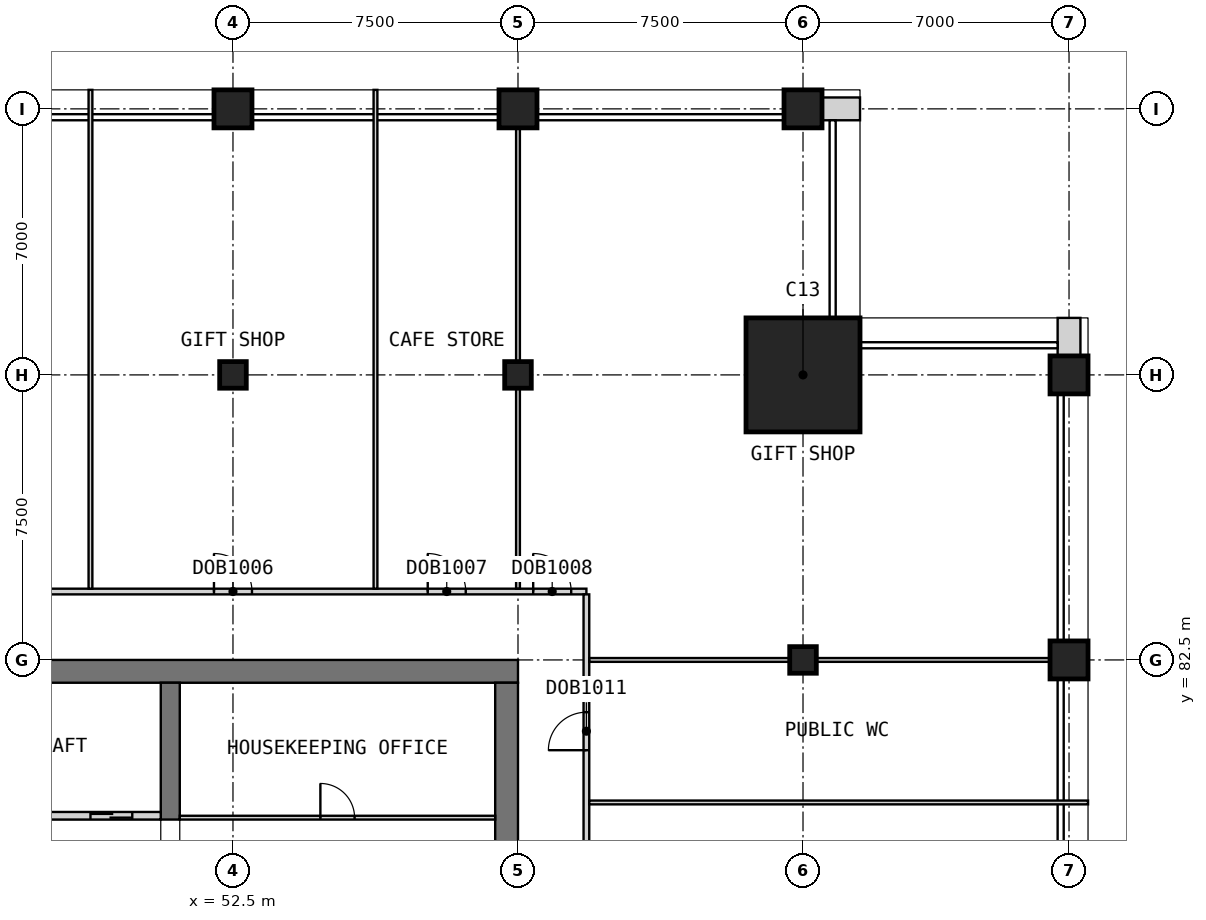
"""IFC4 building model, lengths in metres.
Left out: names, types, materials, properties, quantities, classifications, styles, units other than length and angle.
Written with IfcOpenShell. Run it as: python <this file> out.ifc"""

import sys

from ifc_helpers import new_model, si_unit, direction, frame, frame_2d, origin, origin_2d, place, context, subcontext, project, spatial, rectangle, extrude, element, fill, save


model = new_model("IFC4")
c1 = context("Model", 3, precision=1e-05, world=origin(), true_north=direction((0.0, 1.0)))
c2 = subcontext(c1, "Body", "Model", "MODEL_VIEW")
j1 = project(units=[si_unit("LENGTHUNIT", "METRE"), si_unit("PLANEANGLEUNIT", "RADIAN")], contexts=[c1])
p1 = place(None, origin())
s1 = spatial("IfcSite", under=j1, at=p1, CompositionType="ELEMENT")
p2 = place(p1, origin())
s2 = spatial("IfcBuilding", under=s1, at=p2, CompositionType="ELEMENT")
p3 = place(p2, frame((0.0, 0.0, 302.7)))
s3 = spatial("IfcBuildingStorey", under=s2, at=p3, CompositionType="ELEMENT", Elevation=302.7)
p4 = place(p3, frame((52.5, 90.0, 0.0), z_axis=(0.0, 0.0, 1.0), x_axis=(1.0, 0.0, 0.0)))
e1 = element("IfcColumn", 1, at=p4, inside=s3, PredefinedType="COLUMN", context=c2, shape_type="SweptSolid", body=[
    extrude(rectangle(XDim=0.7, YDim=0.7, at=origin_2d()), origin(), (0.0, 0.0, 1.0), 6.0),
])
p5 = place(p3, frame((52.5, 97.0, 0.0), z_axis=(0.0, 0.0, 1.0), x_axis=(1.0, 0.0, 0.0)))
e2 = element("IfcColumn", 2, at=p5, inside=s3, PredefinedType="COLUMN", context=c2, shape_type="SweptSolid", body=[
    extrude(rectangle(XDim=1.0, YDim=1.0, at=origin_2d()), origin(), (0.0, 0.0, 1.0), 6.0),
])
p6 = place(p3, frame((60.0, 90.0, 0.0), z_axis=(0.0, 0.0, 1.0), x_axis=(1.0, 0.0, 0.0)))
e3 = element("IfcColumn", 3, at=p6, inside=s3, PredefinedType="COLUMN", context=c2, shape_type="SweptSolid", body=[
    extrude(rectangle(XDim=0.7, YDim=0.7, at=origin_2d()), origin(), (0.0, 0.0, 1.0), 6.0),
])
p7 = place(p3, frame((60.0, 97.0, 0.0), z_axis=(0.0, 0.0, 1.0), x_axis=(1.0, 0.0, 0.0)))
e4 = element("IfcColumn", 4, at=p7, inside=s3, PredefinedType="COLUMN", context=c2, shape_type="SweptSolid", body=[
    extrude(rectangle(XDim=1.0, YDim=1.0, at=origin_2d()), origin(), (0.0, 0.0, 1.0), 6.0),
])
p8 = place(p3, frame((67.5, 82.5, 0.0), z_axis=(0.0, 0.0, 1.0), x_axis=(1.0, 0.0, 0.0)))
e5 = element("IfcColumn", 5, at=p8, inside=s3, PredefinedType="COLUMN", context=c2, shape_type="SweptSolid", body=[
    extrude(rectangle(XDim=0.7, YDim=0.7, at=origin_2d()), origin(), (0.0, 0.0, 1.0), 6.0),
])
for number, where, z_axis, x_axis in (
    (6, (67.5, 97.0, 0.0), (0.0, 0.0, 1.0), (1.0, 0.0, 0.0)),
    (7, (74.5, 82.5, 0.0), (0.0, 0.0, 1.0), (1.0, 0.0, 0.0)),
    (8, (74.5, 90.0, 0.0), (0.0, 0.0, 1.0), (1.0, 0.0, 0.0)),
):
    element("IfcColumn", number, at=place(p3, frame(where, z_axis=z_axis, x_axis=x_axis)), inside=s3, PredefinedType="COLUMN", context=c2, shape_type="SweptSolid", body=[
        extrude(rectangle(XDim=1.0, YDim=1.0, at=origin_2d()), origin(), (0.0, 0.0, 1.0), 6.0),
    ])
p9 = place(p3, frame((67.5, 90.0, 0.0), z_axis=(0.0, 0.0, 1.0), x_axis=(1.0, 0.0, 0.0)))
e9 = element("IfcColumn", 9, at=p9, inside=s3, PredefinedType="COLUMN", context=c2, shape_type="SweptSolid", body=[
    extrude(rectangle(XDim=3.0, YDim=3.0, at=origin_2d()), origin(), (0.0, 0.0, 1.0), 6.0),
])
p10 = place(p3, frame((30.0, 82.2, 0.0), z_axis=(0.0, 0.0, 1.0), x_axis=(1.0, 0.0, 0.0)))
e10 = element("IfcWall", 10, at=p10, inside=s3, PredefinedType="SHEAR", context=c2, shape_type="SweptSolid", body=[
    extrude(rectangle(XDim=30.0, YDim=0.6, at=frame_2d((15.0, 0.0))), origin(), (0.0, 0.0, 1.0), 6.0),
])
p11 = place(p3, frame((59.7, 60.6, 0.0), z_axis=(0.0, 0.0, 1.0), x_axis=(0.0, 1.0, 0.0)))
e11 = element("IfcWall", 11, at=p11, inside=s3, PredefinedType="SHEAR", context=c2, shape_type="SweptSolid", body=[
    extrude(rectangle(XDim=21.3, YDim=0.6, at=frame_2d((10.65, 0.0))), origin(), (0.0, 0.0, 1.0), 6.0),
])
p12 = place(p11, frame((14.9, 0.0, 0.0)))
e12 = element("IfcOpeningElement", 12, at=p12, cuts=e11, PredefinedType="OPENING", context=c2, shape_type="SweptSolid", body=[
    extrude(rectangle(XDim=1.8, YDim=2.1, at=frame_2d((0.9, 1.05))), frame((0.0, 0.31, 0.0), z_axis=(0.0, -1.0, 0.0), x_axis=(1.0, 0.0, 0.0)), (0.0, 0.0, 1.0), 0.62),
])
p13 = place(p3, frame((50.85, 78.3, 0.0), z_axis=(0.0, 0.0, 1.0), x_axis=(0.0, 1.0, 0.0)))
e13 = element("IfcWall", 13, at=p13, inside=s3, PredefinedType="SHEAR", context=c2, shape_type="SweptSolid", body=[
    extrude(rectangle(XDim=3.6, YDim=0.5, at=frame_2d((1.8, 0.0))), origin(), (0.0, 0.0, 1.0), 6.0),
])
for number, where, z_axis, x_axis in (
    (14, (74.5, 90.5, 0.0), (0.0, 0.0, 1.0), (0.0, 1.0, 0.0)),
    (15, (69.0, 97.0, 0.0), (0.0, 0.0, 1.0), (-1.0, 0.0, 0.0)),
):
    element("IfcWall", number, at=place(p3, frame(where, z_axis=z_axis, x_axis=x_axis)), inside=s3, PredefinedType="SOLIDWALL", context=c2, shape_type="SweptSolid", body=[
        extrude(rectangle(XDim=1.0, YDim=0.6, at=frame_2d((0.5, 0.0))), origin(), (0.0, 0.0, 1.0), 5.7),
    ])
p14 = place(p3, frame((35.0, 78.4, 0.0), z_axis=(0.0, 0.0, 1.0), x_axis=(1.0, 0.0, 0.0)))
e16 = element("IfcWall", 16, at=p14, inside=s3, PredefinedType="SOLIDWALL", context=c2, shape_type="SweptSolid", body=[
    extrude(rectangle(XDim=15.6, YDim=0.2, at=frame_2d((7.8, 0.0))), origin(), (0.0, 0.0, 1.0), 6.0),
])
p15 = place(p14, frame((0.75, 0.0, 0.0)))
e17 = element("IfcOpeningElement", 17, at=p15, cuts=e16, PredefinedType="OPENING", context=c2, shape_type="SweptSolid", body=[
    extrude(rectangle(XDim=1.1, YDim=2.1, at=frame_2d((0.55, 1.05))), frame((0.0, 0.11, 0.0), z_axis=(0.0, -1.0, 0.0), x_axis=(1.0, 0.0, 0.0)), (0.0, 0.0, 1.0), 0.22),
])
p16 = place(p14, frame((3.35, 0.0, 0.0)))
e18 = element("IfcOpeningElement", 18, at=p16, cuts=e16, PredefinedType="OPENING", context=c2, shape_type="SweptSolid", body=[
    extrude(rectangle(XDim=1.1, YDim=2.1, at=frame_2d((0.55, 1.05))), frame((0.0, 0.11, 0.0), z_axis=(0.0, -1.0, 0.0), x_axis=(1.0, 0.0, 0.0)), (0.0, 0.0, 1.0), 0.22),
])
p17 = place(p14, frame((5.95, 0.0, 0.0)))
e19 = element("IfcOpeningElement", 19, at=p17, cuts=e16, PredefinedType="OPENING", context=c2, shape_type="SweptSolid", body=[
    extrude(rectangle(XDim=1.1, YDim=2.1, at=frame_2d((0.55, 1.05))), frame((0.0, 0.11, 0.0), z_axis=(0.0, -1.0, 0.0), x_axis=(1.0, 0.0, 0.0)), (0.0, 0.0, 1.0), 0.22),
])
p18 = place(p14, frame((8.55, 0.0, 0.0)))
e20 = element("IfcOpeningElement", 20, at=p18, cuts=e16, PredefinedType="OPENING", context=c2, shape_type="SweptSolid", body=[
    extrude(rectangle(XDim=1.1, YDim=2.1, at=frame_2d((0.55, 1.05))), frame((0.0, 0.11, 0.0), z_axis=(0.0, -1.0, 0.0), x_axis=(1.0, 0.0, 0.0)), (0.0, 0.0, 1.0), 0.22),
])
p19 = place(p14, frame((11.15, 0.0, 0.0)))
e21 = element("IfcOpeningElement", 21, at=p19, cuts=e16, PredefinedType="OPENING", context=c2, shape_type="SweptSolid", body=[
    extrude(rectangle(XDim=1.1, YDim=2.1, at=frame_2d((0.55, 1.05))), frame((0.0, 0.11, 0.0), z_axis=(0.0, -1.0, 0.0), x_axis=(1.0, 0.0, 0.0)), (0.0, 0.0, 1.0), 0.22),
])
p20 = place(p14, frame((13.75, 0.0, 0.0)))
e22 = element("IfcOpeningElement", 22, at=p20, cuts=e16, PredefinedType="OPENING", context=c2, shape_type="SweptSolid", body=[
    extrude(rectangle(XDim=1.1, YDim=2.1, at=frame_2d((0.55, 1.05))), frame((0.0, 0.11, 0.0), z_axis=(0.0, -1.0, 0.0), x_axis=(1.0, 0.0, 0.0)), (0.0, 0.0, 1.0), 0.22),
])
p21 = place(p3, frame((51.1, 78.35, 0.0), z_axis=(0.0, 0.0, 1.0), x_axis=(1.0, 0.0, 0.0)))
e23 = element("IfcWall", 23, at=p21, inside=s3, PredefinedType="PARTITIONING", context=c2, shape_type="SweptSolid", body=[
    extrude(rectangle(XDim=8.3, YDim=0.1, at=frame_2d((4.15, 0.0))), origin(), (0.0, 0.0, 1.0), 5.7),
])
p22 = place(p21, frame((3.7, 0.0, 0.0)))
e24 = element("IfcOpeningElement", 24, at=p22, cuts=e23, PredefinedType="OPENING", context=c2, shape_type="SweptSolid", body=[
    extrude(rectangle(XDim=0.9, YDim=2.1, at=frame_2d((0.45, 1.05))), frame((0.0, 0.06, 0.0), z_axis=(0.0, -1.0, 0.0), x_axis=(1.0, 0.0, 0.0)), (0.0, 0.0, 1.0), 0.12),
])
p23 = place(p3, frame((33.75, 84.3, 0.0), z_axis=(0.0, 0.0, 1.0), x_axis=(1.0, 0.0, 0.0)))
e25 = element("IfcWall", 25, at=p23, inside=s3, PredefinedType="PARTITIONING", context=c2, shape_type="SweptSolid", body=[
    extrude(rectangle(XDim=28.05, YDim=0.15, at=frame_2d((14.025, 0.0))), origin(), (0.0, 0.0, 1.0), 5.7),
])
p24 = place(p23, frame((6.6, 0.0, 0.0)))
e26 = element("IfcOpeningElement", 26, at=p24, cuts=e25, PredefinedType="OPENING", context=c2, shape_type="SweptSolid", body=[
    extrude(rectangle(XDim=1.8, YDim=2.1, at=frame_2d((0.9, 1.05))), frame((0.0, 0.085, 0.0), z_axis=(0.0, -1.0, 0.0), x_axis=(1.0, 0.0, 0.0)), (0.0, 0.0, 1.0), 0.17),
])
p25 = place(p23, frame((18.25, 0.0, 0.0)))
e27 = element("IfcOpeningElement", 27, at=p25, cuts=e25, PredefinedType="OPENING", context=c2, shape_type="SweptSolid", body=[
    extrude(rectangle(XDim=1.0, YDim=2.1, at=frame_2d((0.5, 1.05))), frame((0.0, 0.085, 0.0), z_axis=(0.0, -1.0, 0.0), x_axis=(1.0, 0.0, 0.0)), (0.0, 0.0, 1.0), 0.17),
])
p26 = place(p23, frame((23.875, 0.0, 0.0)))
e28 = element("IfcOpeningElement", 28, at=p26, cuts=e25, PredefinedType="OPENING", context=c2, shape_type="SweptSolid", body=[
    extrude(rectangle(XDim=1.0, YDim=2.1, at=frame_2d((0.5, 1.05))), frame((0.0, 0.085, 0.0), z_axis=(0.0, -1.0, 0.0), x_axis=(1.0, 0.0, 0.0)), (0.0, 0.0, 1.0), 0.17),
])
p27 = place(p23, frame((26.65, 0.0, 0.0)))
e29 = element("IfcOpeningElement", 29, at=p27, cuts=e25, PredefinedType="OPENING", context=c2, shape_type="SweptSolid", body=[
    extrude(rectangle(XDim=1.0, YDim=2.1, at=frame_2d((0.5, 1.05))), frame((0.0, 0.085, 0.0), z_axis=(0.0, -1.0, 0.0), x_axis=(1.0, 0.0, 0.0)), (0.0, 0.0, 1.0), 0.17),
])
p28 = place(p3, frame((61.8, 58.275, 0.0), z_axis=(0.0, 0.0, 1.0), x_axis=(0.0, 1.0, 0.0)))
e30 = element("IfcWall", 30, at=p28, inside=s3, PredefinedType="PARTITIONING", context=c2, shape_type="SweptSolid", body=[
    extrude(rectangle(XDim=25.95, YDim=0.15, at=frame_2d((12.975, 0.0))), origin(), (0.0, 0.0, 1.0), 5.7),
])
p29 = place(p28, frame((4.975, 0.0, 0.0)))
e31 = element("IfcOpeningElement", 31, at=p29, cuts=e30, PredefinedType="OPENING", context=c2, shape_type="SweptSolid", body=[
    extrude(rectangle(XDim=1.0, YDim=2.1, at=frame_2d((0.5, 1.05))), frame((0.0, 0.085, 0.0), z_axis=(0.0, -1.0, 0.0), x_axis=(1.0, 0.0, 0.0)), (0.0, 0.0, 1.0), 0.17),
])
p30 = place(p28, frame((13.95, 0.0, 0.0)))
e32 = element("IfcOpeningElement", 32, at=p30, cuts=e30, PredefinedType="OPENING", context=c2, shape_type="SweptSolid", body=[
    extrude(rectangle(XDim=1.8, YDim=2.1, at=frame_2d((0.9, 1.05))), frame((0.0, 0.085, 0.0), z_axis=(0.0, -1.0, 0.0), x_axis=(1.0, 0.0, 0.0)), (0.0, 0.0, 1.0), 0.17),
])
p31 = place(p28, frame((21.85, 0.0, 0.0)))
e33 = element("IfcOpeningElement", 33, at=p31, cuts=e30, PredefinedType="OPENING", context=c2, shape_type="SweptSolid", body=[
    extrude(rectangle(XDim=1.0, YDim=2.1, at=frame_2d((0.5, 1.05))), frame((0.0, 0.085, 0.0), z_axis=(0.0, -1.0, 0.0), x_axis=(1.0, 0.0, 0.0)), (0.0, 0.0, 1.0), 0.17),
])
for number, where, z_axis, x_axis in (
    (34, (61.875, 78.75, 0.0), (0.0, 0.0, 1.0), (1.0, 0.0, 0.0)),
    (35, (61.875, 82.5, 0.0), (0.0, 0.0, 1.0), (1.0, 0.0, 0.0)),
    (36, (48.75, 84.375, 0.0), (0.0, 0.0, 1.0), (0.0, 1.0, 0.0)),
    (37, (56.25, 84.375, 0.0), (0.0, 0.0, 1.0), (0.0, 1.0, 0.0)),
    (38, (60.0, 84.375, 0.0), (0.0, 0.0, 1.0), (0.0, 1.0, 0.0)),
):
    element("IfcWall", number, at=place(p3, frame(where, z_axis=z_axis, x_axis=x_axis)), inside=s3, PredefinedType="PARTITIONING", context=c2, shape_type="SweptSolid", body=[
        extrude(rectangle(XDim=13.125, YDim=0.1, at=frame_2d((6.562, 0.0))), origin(), (0.0, 0.0, 1.0), 5.7),
    ])
p32 = place(p20, origin())
e39 = element("IfcDoor", 39, at=p32, inside=s3, OperationType="DOUBLE_DOOR_SLIDING", PredefinedType="DOOR", context=c2, shape_type="SweptSolid", body=[
    extrude(rectangle(XDim=1.1, YDim=2.1, at=frame_2d((0.55, 1.05))), frame((0.0, 0.025, 0.0), z_axis=(0.0, -1.0, 0.0), x_axis=(1.0, 0.0, 0.0)), (0.0, 0.0, 1.0), 0.05),
])
fill(e22, e39)
p33 = place(p22, origin())
e40 = element("IfcDoor", 40, at=p33, inside=s3, OperationType="SINGLE_SWING_LEFT", PredefinedType="DOOR", context=c2, shape_type="SweptSolid", body=[
    extrude(rectangle(XDim=0.9, YDim=2.1, at=frame_2d((0.45, 1.05))), frame((0.0, 0.025, 0.0), z_axis=(0.0, -1.0, 0.0), x_axis=(1.0, 0.0, 0.0)), (0.0, 0.0, 1.0), 0.05),
])
fill(e24, e40)
p34 = place(p25, origin())
e41 = element("IfcDoor", 41, at=p34, inside=s3, OperationType="SINGLE_SWING_LEFT", PredefinedType="DOOR", context=c2, shape_type="SweptSolid", body=[
    extrude(rectangle(XDim=1.0, YDim=2.1, at=frame_2d((0.5, 1.05))), frame((0.0, 0.025, 0.0), z_axis=(0.0, -1.0, 0.0), x_axis=(1.0, 0.0, 0.0)), (0.0, 0.0, 1.0), 0.05),
])
fill(e27, e41)
p35 = place(p26, origin())
e42 = element("IfcDoor", 42, at=p35, inside=s3, OperationType="SINGLE_SWING_LEFT", PredefinedType="DOOR", context=c2, shape_type="SweptSolid", body=[
    extrude(rectangle(XDim=1.0, YDim=2.1, at=frame_2d((0.5, 1.05))), frame((0.0, 0.025, 0.0), z_axis=(0.0, -1.0, 0.0), x_axis=(1.0, 0.0, 0.0)), (0.0, 0.0, 1.0), 0.05),
])
fill(e28, e42)
p36 = place(p27, origin())
e43 = element("IfcDoor", 43, at=p36, inside=s3, OperationType="SINGLE_SWING_LEFT", PredefinedType="DOOR", context=c2, shape_type="SweptSolid", body=[
    extrude(rectangle(XDim=1.0, YDim=2.1, at=frame_2d((0.5, 1.05))), frame((0.0, 0.025, 0.0), z_axis=(0.0, -1.0, 0.0), x_axis=(1.0, 0.0, 0.0)), (0.0, 0.0, 1.0), 0.05),
])
fill(e29, e43)
p37 = place(p31, origin())
e44 = element("IfcDoor", 44, at=p37, inside=s3, OperationType="SINGLE_SWING_RIGHT", PredefinedType="DOOR", context=c2, shape_type="SweptSolid", body=[
    extrude(rectangle(XDim=1.0, YDim=2.1, at=frame_2d((0.5, 1.05))), frame((0.0, 0.025, 0.0), z_axis=(0.0, -1.0, 0.0), x_axis=(1.0, 0.0, 0.0)), (0.0, 0.0, 1.0), 0.05),
])
fill(e33, e44)
save(model, sys.argv[1])
